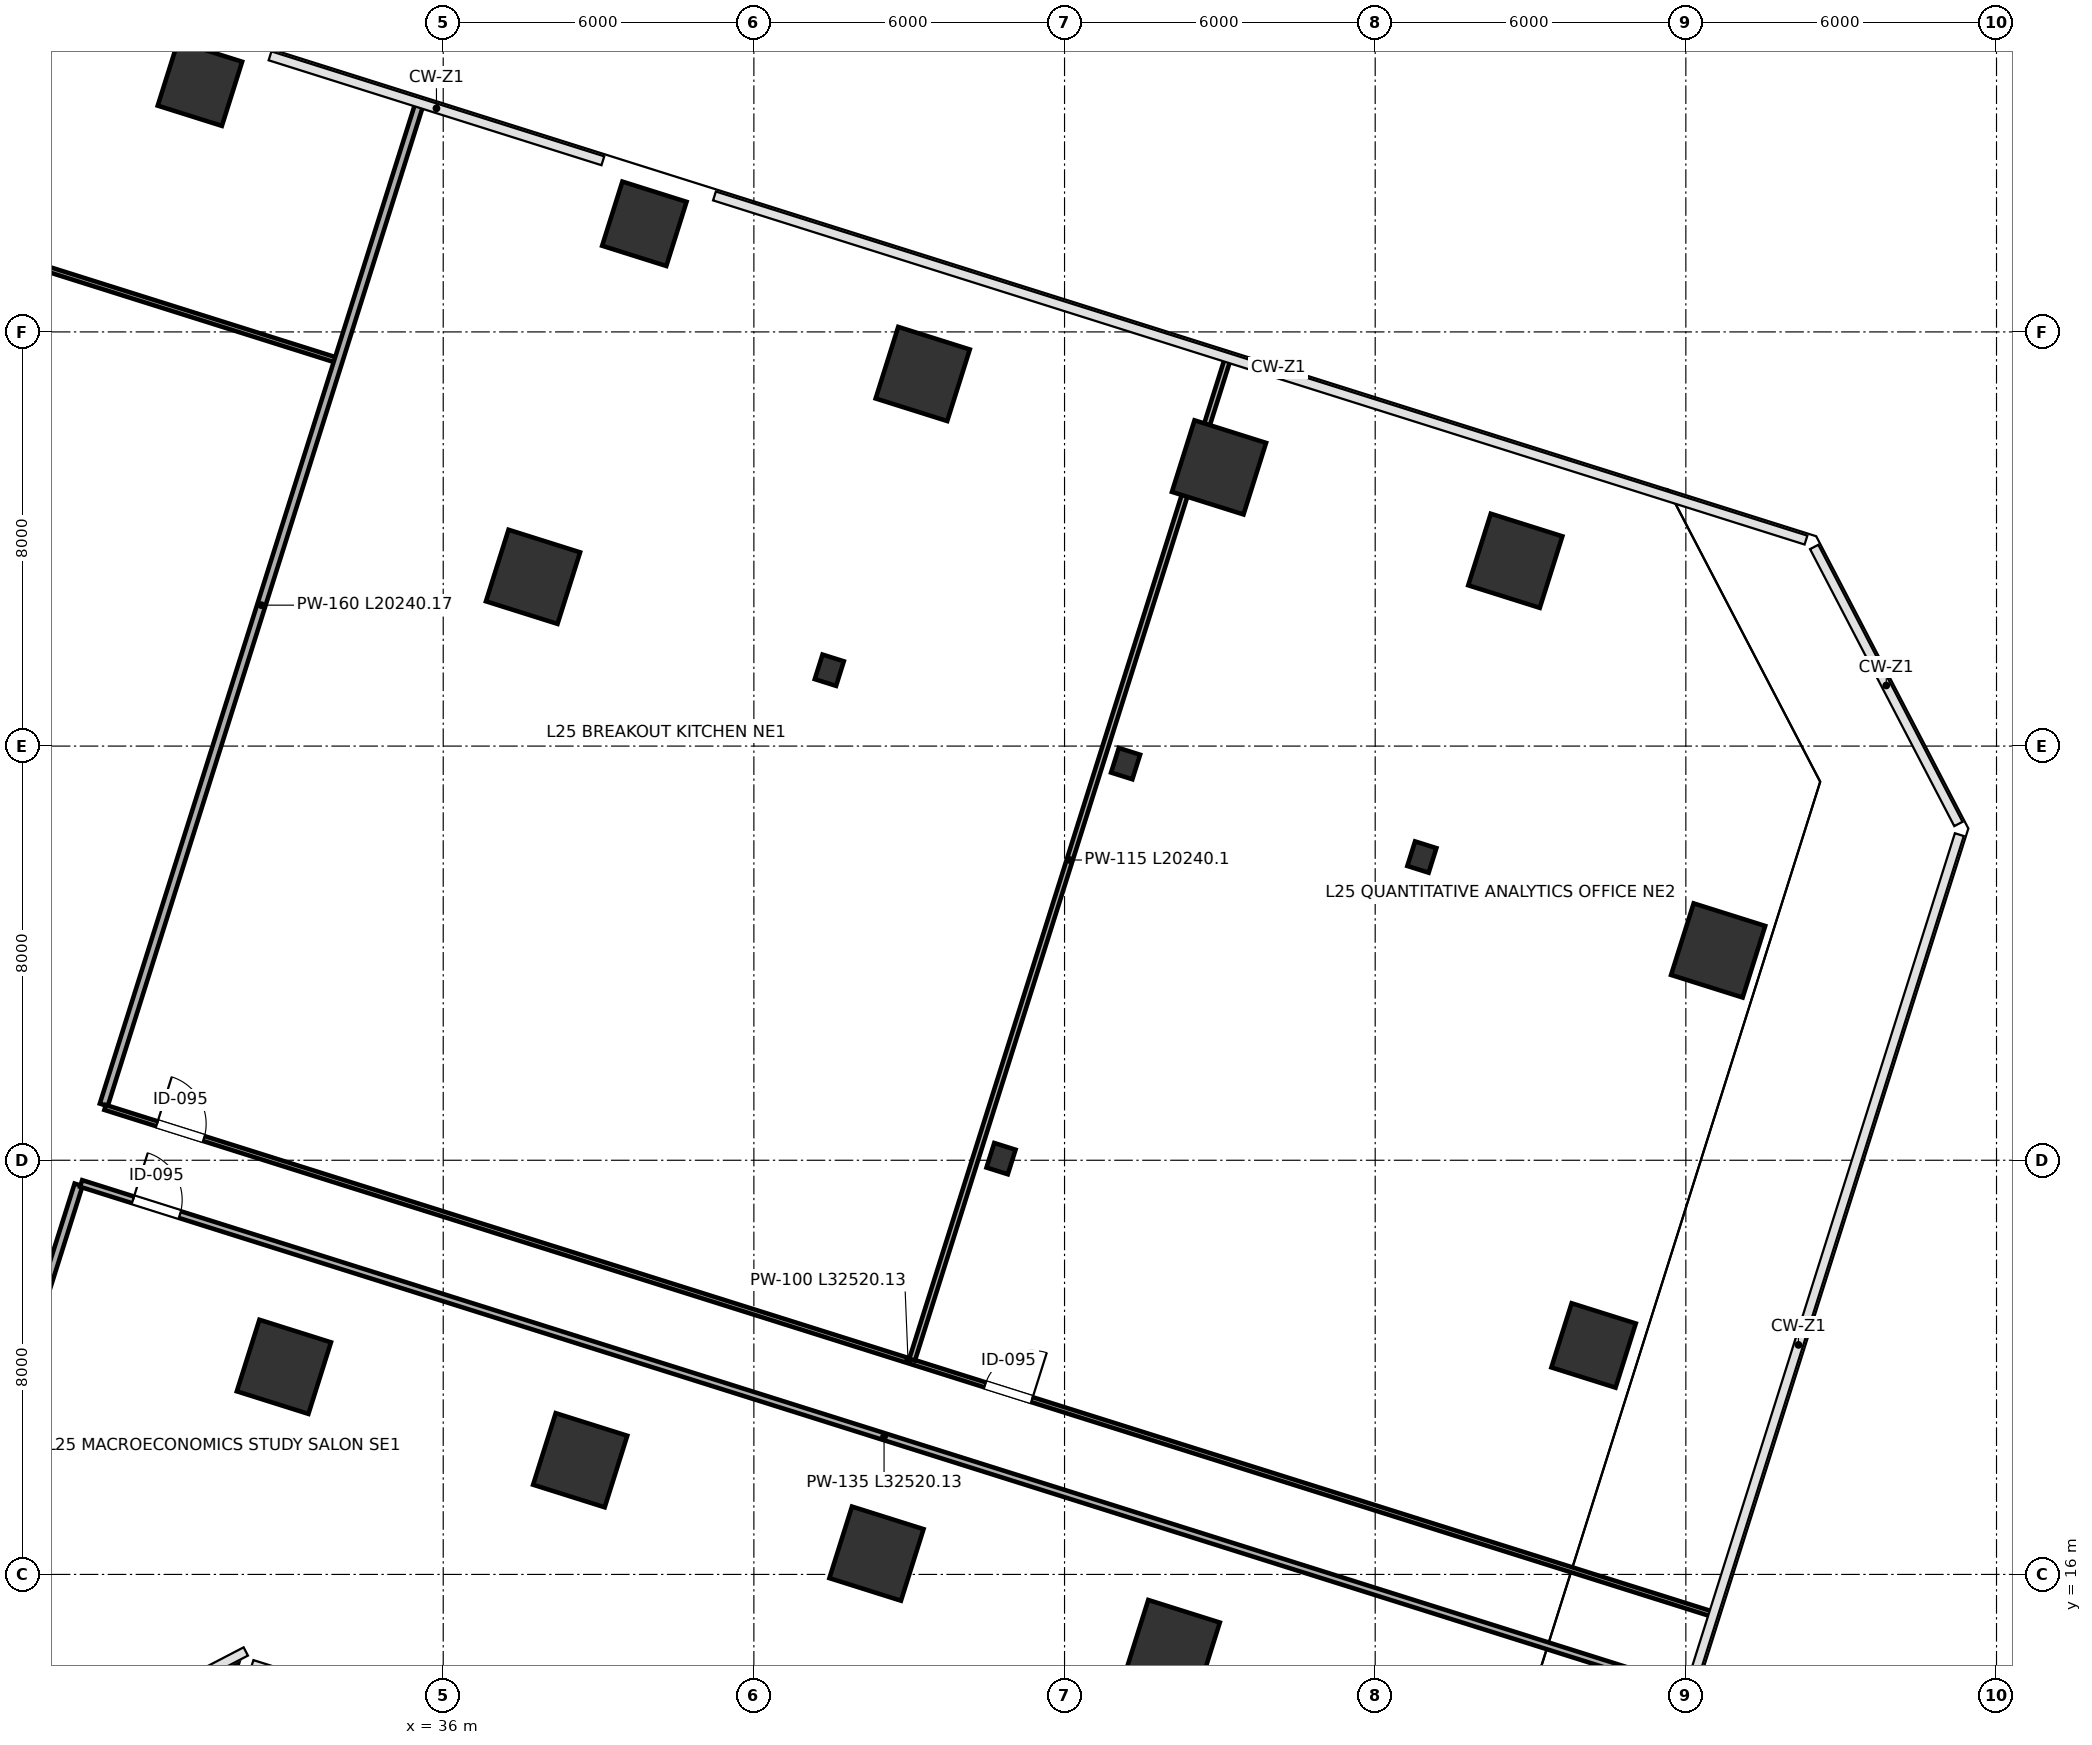
"""IFC4 building model, lengths in metres.
Left out: names, types, materials, properties, quantities, classifications, styles, units other than length and angle.
Written with IfcOpenShell. Run it as: python <this file> out.ifc"""

import sys

from ifc_helpers import new_model, si_unit, direction, frame, frame_2d, origin, origin_2d, place, context, subcontext, project, spatial, rectangle, i_section, extrude, source, transform, mapped, element, fill, save


model = new_model("IFC4")
c1 = context("Model", 3, precision=1e-05, world=origin(), true_north=direction((0.0, 1.0)))
c2 = subcontext(c1, "Body", "Model", "MODEL_VIEW")
j1 = project(units=[si_unit("LENGTHUNIT", "METRE"), si_unit("PLANEANGLEUNIT", "RADIAN")], contexts=[c1])
p1 = place(None, origin())
s1 = spatial("IfcSite", under=j1, at=p1, CompositionType="ELEMENT")
p2 = place(p1, origin())
s2 = spatial("IfcBuilding", under=s1, at=p2, CompositionType="ELEMENT")
p3 = place(p2, frame((0.0, 0.0, 112.6)))
s3 = spatial("IfcBuildingStorey", under=s2, at=p3, CompositionType="ELEMENT", Elevation=112.6)
m1 = source(origin(), c2, "Body", "SweptSolid", [
    extrude(rectangle(XDim=1.3, YDim=1.3, at=origin_2d()), origin(), (0.0, 0.0, 1.0), 4.198),
])
p4 = place(p3, frame((31.301, 44.795, 0.001), z_axis=(0.0, 0.0, 1.0), x_axis=(-0.953716950748, 0.300705799504, 0.0)))
e1 = element("IfcColumn", 1, at=p4, inside=s3, PredefinedType="COLUMN", context=c2, shape_type="MappedRepresentation", body=[
    mapped(m1, transform((0.0, 0.0, 0.0), scale=1.0)),
])
m2 = source(origin(), c2, "Body", "SweptSolid", [
    extrude(rectangle(XDim=1.45, YDim=1.45, at=origin_2d()), origin(), (0.0, 0.0, 1.0), 4.198),
])
for number, where, z_axis, x_axis in (
    (2, (32.923, 20.01, 0.001), (0.0, 0.0, 1.0), (-0.954, 0.301, 0.0)),
    (3, (37.735, 35.27, 0.001), (0.0, 0.0, 1.0), (-0.954, 0.301, 0.0)),
):
    element("IfcColumn", number, at=place(p3, frame(where, z_axis=z_axis, x_axis=x_axis)), inside=s3, PredefinedType="COLUMN", context=c2, shape_type="MappedRepresentation", body=[
        mapped(m2, transform((0.0, 0.0, 0.0), scale=1.0)),
    ])
p5 = place(p3, frame((39.885, 42.089, 0.001), z_axis=(0.0, 0.0, 1.0), x_axis=(-0.953716950748, 0.300705799504, 0.0)))
e4 = element("IfcColumn", 4, at=p5, inside=s3, PredefinedType="COLUMN", context=c2, shape_type="MappedRepresentation", body=[
    mapped(m1, transform((0.0, 0.0, 0.0), scale=1.0)),
])
p6 = place(p3, frame((38.646, 18.206, 0.001), z_axis=(0.0, 0.0, 1.0), x_axis=(-0.953716950748, 0.300705799504, 0.0)))
e5 = element("IfcColumn", 5, at=p6, inside=s3, PredefinedType="COLUMN", context=c2, shape_type="MappedRepresentation", body=[
    mapped(m2, transform((0.0, 0.0, 0.0), scale=1.0)),
])
m3 = source(origin(), c2, "Body", "SweptSolid", [
    extrude(i_section(OverallWidth=0.432, OverallDepth=0.498, WebThickness=0.056, FlangeThickness=0.089, FilletRadius=0.015, at=origin_2d()), origin(), (0.0, 0.0, 1.0), 4.198),
])
p7 = place(p3, frame((43.457, 33.465, 0.001), z_axis=(0.0, 0.0, 1.0), x_axis=(-0.953716950748, 0.300705799504, 0.0)))
e6 = element("IfcColumn", 6, at=p7, inside=s3, PredefinedType="COLUMN", context=c2, shape_type="MappedRepresentation", body=[
    mapped(m3, transform((0.0, 0.0, 0.0), scale=1.0)),
])
for number, where, z_axis, x_axis in (
    (7, (45.261, 39.188, 0.001), (0.0, 0.0, 1.0), (-0.954, 0.301, 0.0)),
    (8, (44.368, 16.402, 0.001), (0.0, 0.0, 1.0), (-0.954, 0.301, 0.0)),
):
    element("IfcColumn", number, at=place(p3, frame(where, z_axis=z_axis, x_axis=x_axis)), inside=s3, PredefinedType="COLUMN", context=c2, shape_type="MappedRepresentation", body=[
        mapped(m2, transform((0.0, 0.0, 0.0), scale=1.0)),
    ])
for number, where, z_axis, x_axis in (
    (9, (46.773, 24.031, 0.001), (0.0, 0.0, 1.0), (-0.954, 0.301, 0.0)),
    (10, (49.179, 31.661, 0.001), (0.0, 0.0, 1.0), (-0.954, 0.301, 0.0)),
):
    element("IfcColumn", number, at=place(p3, frame(where, z_axis=z_axis, x_axis=x_axis)), inside=s3, PredefinedType="COLUMN", context=c2, shape_type="MappedRepresentation", body=[
        mapped(m3, transform((0.0, 0.0, 0.0), scale=1.0)),
    ])
for number, where, z_axis, x_axis in (
    (11, (50.983, 37.383, 0.001), (0.0, 0.0, 1.0), (-0.954, 0.301, 0.0)),
    (12, (50.09, 14.597, 0.001), (0.0, 0.0, 1.0), (-0.954, 0.301, 0.0)),
):
    element("IfcColumn", number, at=place(p3, frame(where, z_axis=z_axis, x_axis=x_axis)), inside=s3, PredefinedType="COLUMN", context=c2, shape_type="MappedRepresentation", body=[
        mapped(m2, transform((0.0, 0.0, 0.0), scale=1.0)),
    ])
p8 = place(p3, frame((54.901, 29.857, 0.001), z_axis=(0.0, 0.0, 1.0), x_axis=(-0.953716950748, 0.300705799504, 0.0)))
e13 = element("IfcColumn", 13, at=p8, inside=s3, PredefinedType="COLUMN", context=c2, shape_type="MappedRepresentation", body=[
    mapped(m3, transform((0.0, 0.0, 0.0), scale=1.0)),
])
p9 = place(p3, frame((56.706, 35.579, 0.001), z_axis=(0.0, 0.0, 1.0), x_axis=(-0.953716950748, 0.300705799504, 0.0)))
e14 = element("IfcColumn", 14, at=p9, inside=s3, PredefinedType="COLUMN", context=c2, shape_type="MappedRepresentation", body=[
    mapped(m2, transform((0.0, 0.0, 0.0), scale=1.0)),
])
p10 = place(p3, frame((58.218, 20.423, 0.001), z_axis=(0.0, 0.0, 1.0), x_axis=(-0.953716950748, 0.300705799504, 0.0)))
e15 = element("IfcColumn", 15, at=p10, inside=s3, PredefinedType="COLUMN", context=c2, shape_type="MappedRepresentation", body=[
    mapped(m1, transform((0.0, 0.0, 0.0), scale=1.0)),
])
m4 = source(origin(), c2, "Body", "SweptSolid", [
    extrude(rectangle(XDim=1.45, YDim=1.45, at=origin_2d()), origin(), (0.0, 0.0, 1.0), 4.198),
])
p11 = place(p3, frame((60.624, 28.052, 0.001), z_axis=(0.0, 0.0, 1.0), x_axis=(-0.953716950748, 0.300705799504, 0.0)))
e16 = element("IfcColumn", 16, at=p11, inside=s3, PredefinedType="COLUMN", context=c2, shape_type="MappedRepresentation", body=[
    mapped(m4, transform((0.0, 0.0, 0.0), scale=1.0)),
])
p12 = place(p3, frame((8.053, 47.616, 0.0), z_axis=(0.0, 0.0, 1.0), x_axis=(0.953717706363, -0.300703402989, 0.0)))
e17 = element("IfcWall", 17, at=p12, inside=s3, PredefinedType="PARTITIONING", context=c2, shape_type="SweptSolid", body=[
    extrude(rectangle(XDim=27.14, YDim=0.1, at=frame_2d((13.57, 0.0))), origin(), (0.0, 0.0, 1.0), 3.96),
])
p13 = place(p12, frame((0.91, 0.0, 0.0)))
e18 = element("IfcOpeningElement", 18, at=p13, cuts=e17, PredefinedType="OPENING", context=c2, shape_type="SweptSolid", body=[
    extrude(rectangle(XDim=0.95, YDim=2.15, at=frame_2d((0.475, 1.075))), frame((0.0, 0.06, 0.0), z_axis=(0.0, -1.0, 0.0), x_axis=(1.0, 0.0, 0.0)), (0.0, 0.0, 1.0), 0.12),
])
p14 = place(p3, frame((29.444, 25.07, 0.0), z_axis=(0.0, 0.0, 1.0), x_axis=(0.300708769024, 0.953716014457, 0.0)))
e19 = element("IfcWall", 19, at=p14, inside=s3, PredefinedType="PARTITIONING", context=c2, shape_type="SweptSolid", body=[
    extrude(rectangle(XDim=20.24, YDim=0.16, at=frame_2d((10.12, 0.0))), origin(), (0.0, 0.0, 1.0), 3.095),
])
p15 = place(p3, frame((25.294, 11.909, 0.0), z_axis=(0.0, 0.0, 1.0), x_axis=(0.300707324156, 0.953716470026, 0.0)))
e20 = element("IfcWall", 20, at=p15, inside=s3, PredefinedType="PARTITIONING", context=c2, shape_type="SweptSolid", body=[
    extrude(rectangle(XDim=12.18, YDim=0.16, at=frame_2d((6.09, 0.0))), origin(), (0.0, 0.0, 1.0), 3.96),
])
p16 = place(p3, frame((29.47, 25.02, 0.0), z_axis=(0.0, 0.0, 1.0), x_axis=(0.953716794744, -0.300706294286, 0.0)))
e21 = element("IfcWall", 21, at=p16, inside=s3, PredefinedType="PARTITIONING", context=c2, shape_type="SweptSolid", body=[
    extrude(rectangle(XDim=32.52, YDim=0.1, at=frame_2d((16.26, 0.0))), origin(), (0.0, 0.0, 1.0), 3.095),
])
p17 = place(p16, frame((1.05, 0.0, 0.0)))
e22 = element("IfcOpeningElement", 22, at=p17, cuts=e21, PredefinedType="OPENING", context=c2, shape_type="SweptSolid", body=[
    extrude(rectangle(XDim=0.95, YDim=2.15, at=frame_2d((0.475, 1.075))), frame((0.0, 0.06, 0.0), z_axis=(0.0, -1.0, 0.0), x_axis=(1.0, 0.0, 0.0)), (0.0, 0.0, 1.0), 0.12),
])
p18 = place(p16, frame((17.82, 0.0, 0.0)))
e23 = element("IfcOpeningElement", 23, at=p18, cuts=e21, PredefinedType="OPENING", context=c2, shape_type="SweptSolid", body=[
    extrude(rectangle(XDim=0.95, YDim=2.15, at=frame_2d((0.475, 1.075))), frame((0.0, 0.06, 0.0), z_axis=(0.0, -1.0, 0.0), x_axis=(1.0, 0.0, 0.0)), (0.0, 0.0, 1.0), 0.12),
])
p19 = place(p3, frame((29.007, 23.552, 0.0), z_axis=(0.0, 0.0, 1.0), x_axis=(0.953718947743, -0.300699465773, 0.0)))
e24 = element("IfcWall", 24, at=p19, inside=s3, PredefinedType="PARTITIONING", context=c2, shape_type="SweptSolid", body=[
    extrude(rectangle(XDim=32.52, YDim=0.135, at=frame_2d((16.26, 0.0))), origin(), (0.0, 0.0, 1.0), 3.095),
])
p20 = place(p19, frame((1.05, 0.0, 0.0)))
e25 = element("IfcOpeningElement", 25, at=p20, cuts=e24, PredefinedType="OPENING", context=c2, shape_type="SweptSolid", body=[
    extrude(rectangle(XDim=0.95, YDim=2.15, at=frame_2d((0.475, 1.075))), frame((0.0, 0.078, 0.0), z_axis=(0.0, -1.0, 0.0), x_axis=(1.0, 0.0, 0.0)), (0.0, 0.0, 1.0), 0.155),
])
p21 = place(p3, frame((45.056, 20.148, 0.0), z_axis=(0.0, 0.0, 1.0), x_axis=(0.300712228368, 0.953714923712, 0.0)))
e26 = element("IfcWall", 26, at=p21, inside=s3, PredefinedType="PARTITIONING", context=c2, shape_type="SweptSolid", body=[
    extrude(rectangle(XDim=20.24, YDim=0.115, at=frame_2d((10.12, 0.0))), origin(), (0.0, 0.0, 1.0), 3.323),
])
m5 = source(origin(), c2, "Body", "SweptSolid", [
    extrude(rectangle(XDim=0.95, YDim=2.15, at=frame_2d((0.475, 1.075))), frame((0.0, 0.025, 0.0), z_axis=(0.0, -1.0, 0.0), x_axis=(1.0, 0.0, 0.0)), (0.0, 0.0, 1.0), 0.05),
])
p22 = place(p17, origin())
e27 = element("IfcDoor", 27, at=p22, inside=s3, OperationType="SINGLE_SWING_LEFT", PredefinedType="DOOR", context=c2, shape_type="MappedRepresentation", body=[
    mapped(m5, transform((0.0, 0.0, 0.0), scale=1.0)),
])
fill(e22, e27)
p23 = place(p18, origin())
e28 = element("IfcDoor", 28, at=p23, inside=s3, OperationType="SINGLE_SWING_RIGHT", PredefinedType="DOOR", context=c2, shape_type="MappedRepresentation", body=[
    mapped(m5, transform((0.0, 0.0, 0.0), scale=1.0)),
])
fill(e23, e28)
p24 = place(p20, origin())
e29 = element("IfcDoor", 29, at=p24, inside=s3, OperationType="SINGLE_SWING_LEFT", PredefinedType="DOOR", context=c2, shape_type="MappedRepresentation", body=[
    mapped(m5, transform((0.0, 0.0, 0.0), scale=1.0)),
])
fill(e25, e29)
save(model, sys.argv[1])
